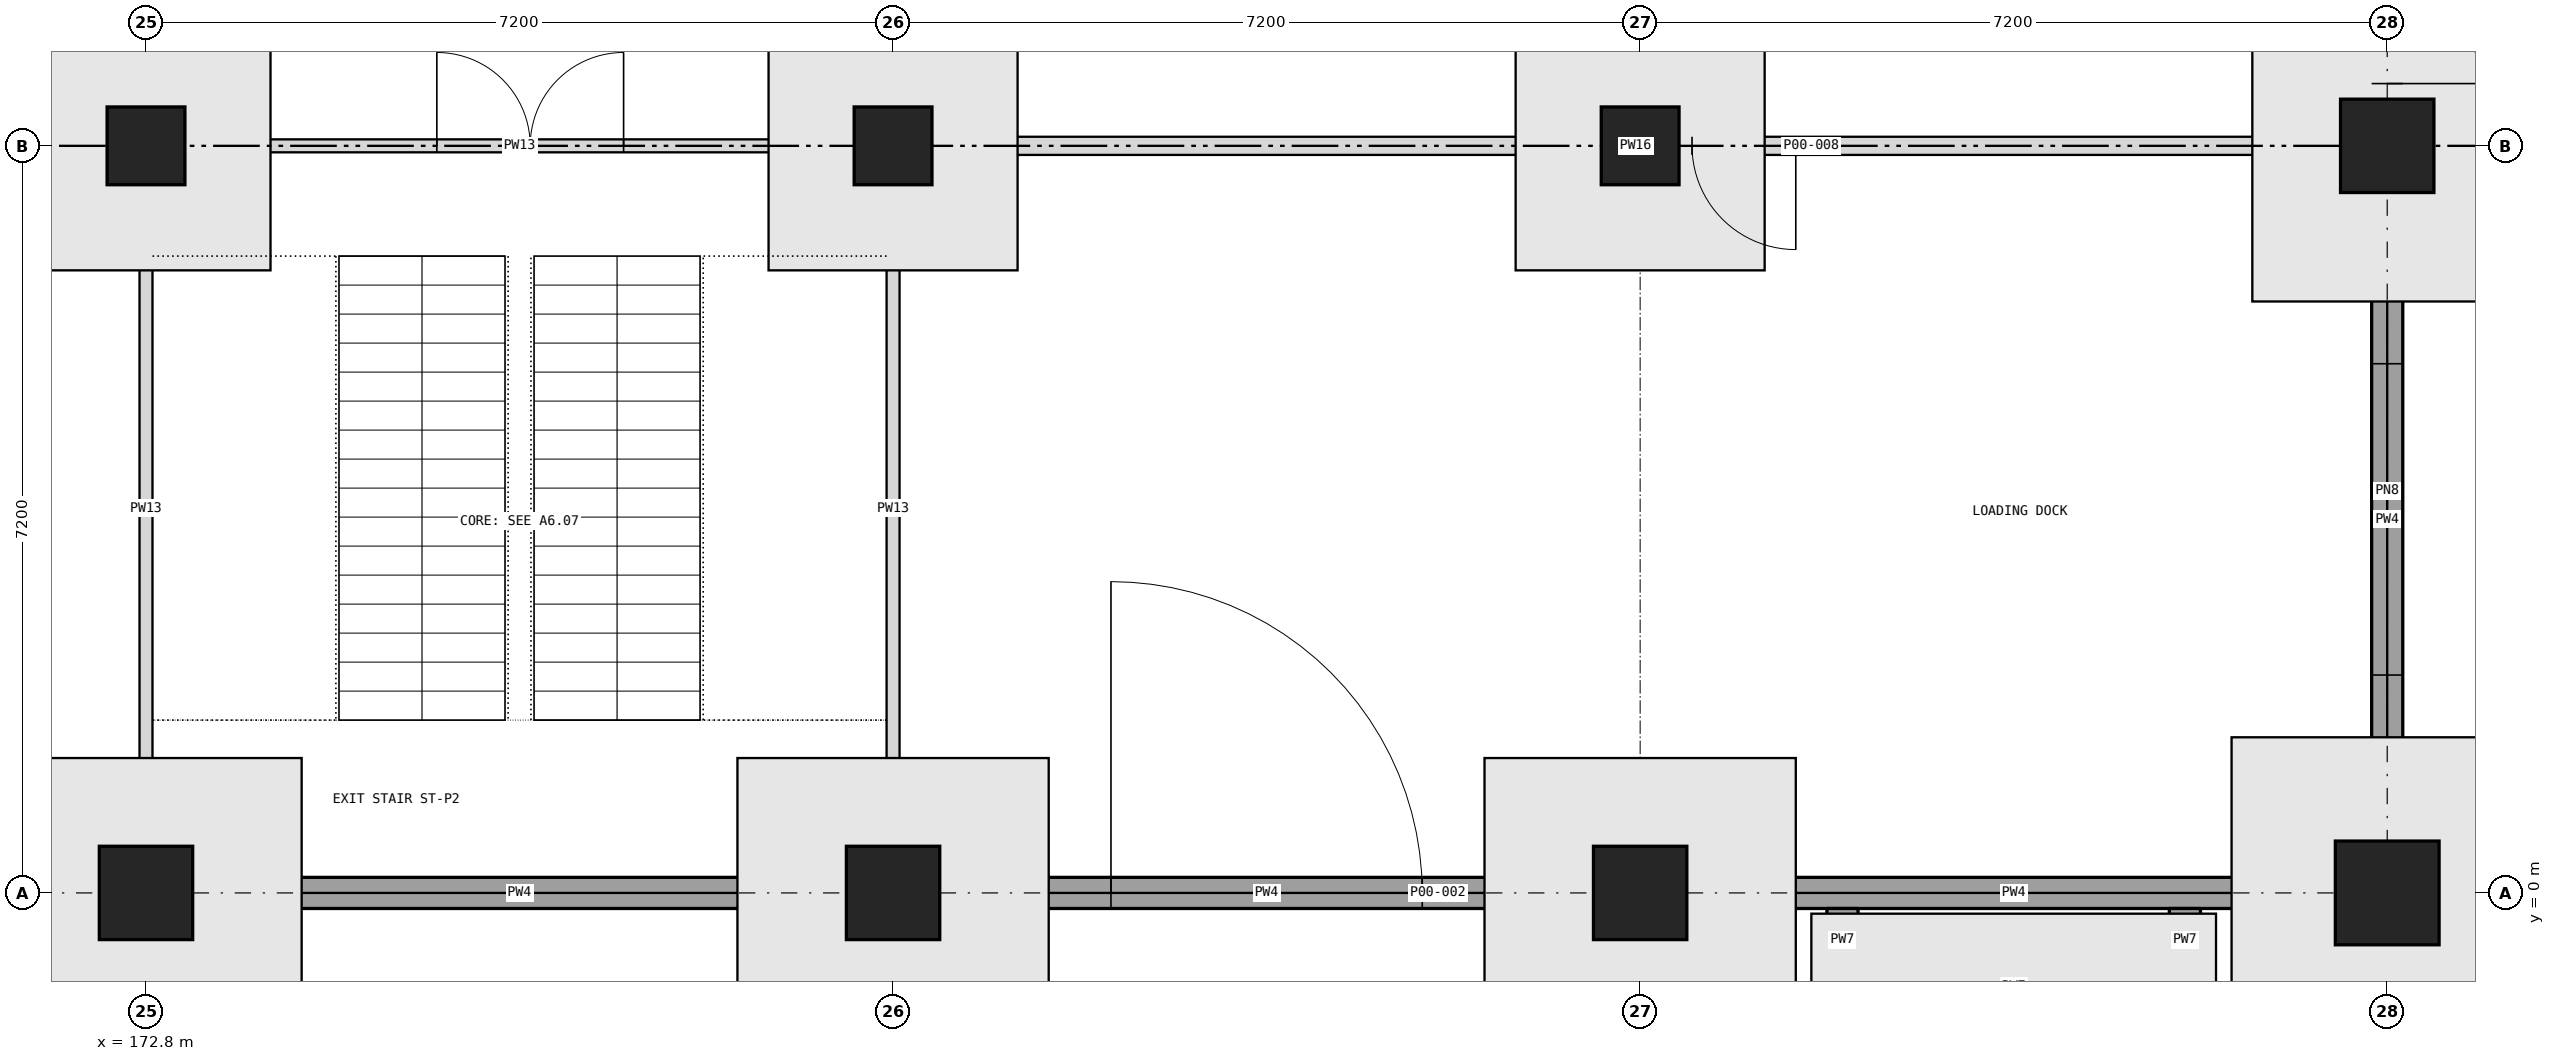
"""IFC4 building model, lengths in metres.
Left out: names, types, materials, properties, quantities, classifications, styles, units other than length and angle.
Written with IfcOpenShell. Run it as: python <this file> out.ifc"""

import sys

from ifc_helpers import new_model, si_unit, direction, frame, frame_2d, origin, origin_2d, place, context, subcontext, project, spatial, rectangle, extrude, element, fill, save


model = new_model("IFC4")
c1 = context("Model", 3, precision=1e-05, world=origin(), true_north=direction((0.0, 1.0)))
c2 = subcontext(c1, "Body", "Model", "MODEL_VIEW")
j1 = project(units=[si_unit("LENGTHUNIT", "METRE"), si_unit("PLANEANGLEUNIT", "RADIAN")], contexts=[c1])
p1 = place(None, origin())
s1 = spatial("IfcSite", under=j1, at=p1, CompositionType="ELEMENT")
p2 = place(p1, origin())
s2 = spatial("IfcBuilding", under=s1, at=p2, CompositionType="ELEMENT")
p3 = place(p2, origin())
s3 = spatial("IfcBuildingStorey", under=s2, at=p3, CompositionType="ELEMENT", Elevation=0.0)
p4 = place(p3, frame((172.8, 0.0, 0.0), z_axis=(0.0, 0.0, 1.0), x_axis=(1.0, 0.0, 0.0)))
e1 = element("IfcColumn", 1, at=p4, inside=s3, PredefinedType="COLUMN", context=c2, shape_type="SweptSolid", body=[
    extrude(rectangle(XDim=0.9, YDim=0.9, at=origin_2d()), origin(), (0.0, 0.0, 1.0), 6.0),
])
p5 = place(p3, frame((172.8, 7.2, 0.0), z_axis=(0.0, 0.0, 1.0), x_axis=(1.0, 0.0, 0.0)))
e2 = element("IfcColumn", 2, at=p5, inside=s3, PredefinedType="COLUMN", context=c2, shape_type="SweptSolid", body=[
    extrude(rectangle(XDim=0.75, YDim=0.75, at=origin_2d()), origin(), (0.0, 0.0, 1.0), 6.0),
])
p6 = place(p3, frame((180.0, 0.0, 0.0), z_axis=(0.0, 0.0, 1.0), x_axis=(1.0, 0.0, 0.0)))
e3 = element("IfcColumn", 3, at=p6, inside=s3, PredefinedType="COLUMN", context=c2, shape_type="SweptSolid", body=[
    extrude(rectangle(XDim=0.9, YDim=0.9, at=origin_2d()), origin(), (0.0, 0.0, 1.0), 6.0),
])
p7 = place(p3, frame((180.0, 7.2, 0.0), z_axis=(0.0, 0.0, 1.0), x_axis=(1.0, 0.0, 0.0)))
e4 = element("IfcColumn", 4, at=p7, inside=s3, PredefinedType="COLUMN", context=c2, shape_type="SweptSolid", body=[
    extrude(rectangle(XDim=0.75, YDim=0.75, at=origin_2d()), origin(), (0.0, 0.0, 1.0), 6.0),
])
p8 = place(p3, frame((187.2, 0.0, 0.0), z_axis=(0.0, 0.0, 1.0), x_axis=(1.0, 0.0, 0.0)))
e5 = element("IfcColumn", 5, at=p8, inside=s3, PredefinedType="COLUMN", context=c2, shape_type="SweptSolid", body=[
    extrude(rectangle(XDim=0.9, YDim=0.9, at=origin_2d()), origin(), (0.0, 0.0, 1.0), 6.0),
])
p9 = place(p3, frame((187.2, 7.2, 0.0), z_axis=(0.0, 0.0, 1.0), x_axis=(1.0, 0.0, 0.0)))
e6 = element("IfcColumn", 6, at=p9, inside=s3, PredefinedType="COLUMN", context=c2, shape_type="SweptSolid", body=[
    extrude(rectangle(XDim=0.75, YDim=0.75, at=origin_2d()), origin(), (0.0, 0.0, 1.0), 6.0),
])
p10 = place(p3, frame((194.4, 0.0, 0.0), z_axis=(0.0, 0.0, 1.0), x_axis=(1.0, 0.0, 0.0)))
e7 = element("IfcColumn", 7, at=p10, inside=s3, PredefinedType="COLUMN", context=c2, shape_type="SweptSolid", body=[
    extrude(rectangle(XDim=1.0, YDim=1.0, at=origin_2d()), origin(), (0.0, 0.0, 1.0), 6.0),
])
p11 = place(p3, frame((194.4, 7.2, 0.0), z_axis=(0.0, 0.0, 1.0), x_axis=(1.0, 0.0, 0.0)))
e8 = element("IfcColumn", 8, at=p11, inside=s3, PredefinedType="COLUMN", context=c2, shape_type="SweptSolid", body=[
    extrude(rectangle(XDim=0.9, YDim=0.9, at=origin_2d()), origin(), (0.0, 0.0, 1.0), 6.0),
])
for number, where, z_axis, x_axis in (
    (9, (166.05, 0.0, 0.0), (0.0, 0.0, 1.0), (1.0, 0.0, 0.0)),
    (10, (173.25, 0.0, 0.0), (0.0, 0.0, 1.0), (1.0, 0.0, 0.0)),
):
    element("IfcWall", number, at=place(p3, frame(where, z_axis=z_axis, x_axis=x_axis)), inside=s3, PredefinedType="SOLIDWALL", context=c2, shape_type="SweptSolid", body=[
        extrude(rectangle(XDim=6.3, YDim=0.3, at=frame_2d((3.15, 0.0))), origin(), (0.0, 0.0, 1.0), 5.1),
    ])
p12 = place(p3, frame((180.45, 0.0, 0.0), z_axis=(0.0, 0.0, 1.0), x_axis=(1.0, 0.0, 0.0)))
e11 = element("IfcWall", 11, at=p12, inside=s3, PredefinedType="SOLIDWALL", context=c2, shape_type="SweptSolid", body=[
    extrude(rectangle(XDim=6.3, YDim=0.3, at=frame_2d((3.15, 0.0))), origin(), (0.0, 0.0, 1.0), 5.1),
])
p13 = place(p12, frame((1.65, 0.0, 0.0)))
e12 = element("IfcOpeningElement", 12, at=p13, cuts=e11, PredefinedType="OPENING", context=c2, shape_type="SweptSolid", body=[
    extrude(rectangle(XDim=3.0, YDim=3.0, at=frame_2d((1.5, 1.5))), frame((0.0, 0.16, 0.0), z_axis=(0.0, -1.0, 0.0), x_axis=(1.0, 0.0, 0.0)), (0.0, 0.0, 1.0), 0.32),
])
p14 = place(p3, frame((187.65, 0.0, 0.0), z_axis=(0.0, 0.0, 1.0), x_axis=(1.0, 0.0, 0.0)))
e13 = element("IfcWall", 13, at=p14, inside=s3, PredefinedType="SOLIDWALL", context=c2, shape_type="SweptSolid", body=[
    extrude(rectangle(XDim=6.3, YDim=0.3, at=frame_2d((3.15, 0.0))), origin(), (0.0, 0.0, 1.0), 5.1),
])
p15 = place(p3, frame((194.4, 0.45, 0.0), z_axis=(0.0, 0.0, 1.0), x_axis=(0.0, 1.0, 0.0)))
e14 = element("IfcWall", 14, at=p15, inside=s3, PredefinedType="SOLIDWALL", context=c2, shape_type="SweptSolid", body=[
    extrude(rectangle(XDim=6.3, YDim=0.3, at=frame_2d((3.15, 0.0))), origin(), (0.0, 0.0, 1.0), 5.1),
])
p16 = place(p15, frame((1.65, 0.0, 2.4)))
e15 = element("IfcOpeningElement", 15, at=p16, cuts=e14, PredefinedType="OPENING", context=c2, shape_type="SweptSolid", body=[
    extrude(rectangle(XDim=3.0, YDim=1.2, at=frame_2d((1.5, 0.6))), frame((0.0, 0.16, 0.0), z_axis=(0.0, -1.0, 0.0), x_axis=(1.0, 0.0, 0.0)), (0.0, 0.0, 1.0), 0.32),
])
p17 = place(p3, frame((194.4, 7.65, 0.0), z_axis=(0.0, 0.0, 1.0), x_axis=(0.0, 1.0, 0.0)))
e16 = element("IfcWall", 16, at=p17, inside=s3, PredefinedType="SOLIDWALL", context=c2, shape_type="SweptSolid", body=[
    extrude(rectangle(XDim=6.3, YDim=0.3, at=frame_2d((3.15, 0.0))), origin(), (0.0, 0.0, 1.0), 5.1),
])
p18 = place(p17, frame((0.15, 0.0, 0.0)))
e17 = element("IfcOpeningElement", 17, at=p18, cuts=e16, PredefinedType="OPENING", context=c2, shape_type="SweptSolid", body=[
    extrude(rectangle(XDim=1.8, YDim=2.1, at=frame_2d((0.9, 1.05))), frame((0.0, 0.16, 0.0), z_axis=(0.0, -1.0, 0.0), x_axis=(1.0, 0.0, 0.0)), (0.0, 0.0, 1.0), 0.32),
])
p19 = place(p3, frame((189.0, -0.9, -0.5), z_axis=(0.0, 0.0, 1.0), x_axis=(1.0, 0.0, 0.0)))
e18 = element("IfcWall", 18, at=p19, inside=s3, PredefinedType="SOLIDWALL", context=c2, shape_type="SweptSolid", body=[
    extrude(rectangle(XDim=3.6, YDim=0.3, at=frame_2d((1.8, 0.0))), origin(), (0.0, 0.0, 1.0), 6.2),
])
for number, where, z_axis, x_axis in (
    (19, (189.15, -0.75, -0.5), (0.0, 0.0, 1.0), (0.0, 1.0, 0.0)),
    (20, (192.45, -0.75, -0.5), (0.0, 0.0, 1.0), (0.0, 1.0, 0.0)),
):
    element("IfcWall", number, at=place(p3, frame(where, z_axis=z_axis, x_axis=x_axis)), inside=s3, PredefinedType="SOLIDWALL", context=c2, shape_type="SweptSolid", body=[
        extrude(rectangle(XDim=0.6, YDim=0.3, at=frame_2d((0.3, 0.0))), origin(), (0.0, 0.0, 1.0), 6.2),
    ])
p20 = place(p3, frame((165.663, 7.2, 0.0), z_axis=(0.0, 0.0, 1.0), x_axis=(1.0, 0.0, 0.0)))
e21 = element("IfcWall", 21, at=p20, inside=s3, PredefinedType="PARTITIONING", context=c2, shape_type="SweptSolid", body=[
    extrude(rectangle(XDim=7.075, YDim=0.175, at=frame_2d((3.538, 0.0))), origin(), (0.0, 0.0, 1.0), 5.5),
])
p21 = place(p20, frame((3.038, 0.0, 0.0)))
e22 = element("IfcOpeningElement", 22, at=p21, cuts=e21, PredefinedType="OPENING", context=c2, shape_type="SweptSolid", body=[
    extrude(rectangle(XDim=1.0, YDim=2.2, at=frame_2d((0.5, 1.1))), frame((0.0, 0.097, 0.0), z_axis=(0.0, -1.0, 0.0), x_axis=(1.0, 0.0, 0.0)), (0.0, 0.0, 1.0), 0.195),
])
p22 = place(p3, frame((172.863, 7.2, 0.0), z_axis=(0.0, 0.0, 1.0), x_axis=(1.0, 0.0, 0.0)))
e23 = element("IfcWall", 23, at=p22, inside=s3, PredefinedType="SOLIDWALL", context=c2, shape_type="SweptSolid", body=[
    extrude(rectangle(XDim=7.075, YDim=0.125, at=frame_2d((3.538, 0.0))), origin(), (0.0, 0.0, 1.0), 5.5),
])
p23 = place(p22, frame((2.74, 0.0, 0.0)))
e24 = element("IfcOpeningElement", 24, at=p23, cuts=e23, PredefinedType="OPENING", context=c2, shape_type="SweptSolid", body=[
    extrude(rectangle(XDim=1.8, YDim=2.1, at=frame_2d((0.9, 1.05))), frame((0.0, 0.073, 0.0), z_axis=(0.0, -1.0, 0.0), x_axis=(1.0, 0.0, 0.0)), (0.0, 0.0, 1.0), 0.145),
])
p24 = place(p3, frame((180.062, 7.2, 0.0), z_axis=(0.0, 0.0, 1.0), x_axis=(1.0, 0.0, 0.0)))
e25 = element("IfcWall", 25, at=p24, inside=s3, PredefinedType="PARTITIONING", context=c2, shape_type="SweptSolid", body=[
    extrude(rectangle(XDim=14.188, YDim=0.175, at=frame_2d((7.094, 0.0))), origin(), (0.0, 0.0, 1.0), 5.5),
])
p25 = place(p24, frame((7.637, 0.0, 0.0)))
e26 = element("IfcOpeningElement", 26, at=p25, cuts=e25, PredefinedType="OPENING", context=c2, shape_type="SweptSolid", body=[
    extrude(rectangle(XDim=1.0, YDim=2.1, at=frame_2d((0.5, 1.05))), frame((0.0, 0.097, 0.0), z_axis=(0.0, -1.0, 0.0), x_axis=(1.0, 0.0, 0.0)), (0.0, 0.0, 1.0), 0.195),
])
for number, where, z_axis, x_axis in (
    (27, (172.8, 0.15, 0.0), (0.0, 0.0, 1.0), (0.0, 1.0, 0.0)),
    (28, (180.0, 0.15, 0.0), (0.0, 0.0, 1.0), (0.0, 1.0, 0.0)),
):
    element("IfcWall", number, at=place(p3, frame(where, z_axis=z_axis, x_axis=x_axis)), inside=s3, PredefinedType="SOLIDWALL", context=c2, shape_type="SweptSolid", body=[
        extrude(rectangle(XDim=7.113, YDim=0.125, at=frame_2d((3.556, 0.0))), origin(), (0.0, 0.0, 1.0), 5.5),
    ])
p26 = place(p13, frame((3.0, 0.0, 0.0), z_axis=(0.0, 0.0, 1.0), x_axis=(-1.0, 0.0, 0.0)))
e29 = element("IfcDoor", 29, at=p26, inside=s3, OperationType="ROLLINGUP", PredefinedType="DOOR", context=c2, shape_type="SweptSolid", body=[
    extrude(rectangle(XDim=3.0, YDim=3.0, at=frame_2d((1.5, 1.5))), frame((0.0, 0.025, 0.0), z_axis=(0.0, -1.0, 0.0), x_axis=(1.0, 0.0, 0.0)), (0.0, 0.0, 1.0), 0.05),
])
fill(e12, e29)
p27 = place(p16, origin())
e30 = element("IfcWindow", 30, at=p27, inside=s3, PartitioningType="DOUBLE_PANEL_VERTICAL", PredefinedType="WINDOW", context=c2, shape_type="SweptSolid", body=[
    extrude(rectangle(XDim=3.0, YDim=1.2, at=frame_2d((1.5, 0.6))), frame((0.0, 0.12, 0.0), z_axis=(0.0, -1.0, 0.0), x_axis=(1.0, 0.0, 0.0)), (0.0, 0.0, 1.0), 0.06),
])
fill(e15, e30)
p28 = place(p18, frame((1.8, 0.0, 0.0), z_axis=(0.0, 0.0, 1.0), x_axis=(-1.0, 0.0, 0.0)))
e31 = element("IfcDoor", 31, at=p28, inside=s3, OperationType="DOUBLE_DOOR_SINGLE_SWING", PredefinedType="DOOR", context=c2, shape_type="SweptSolid", body=[
    extrude(rectangle(XDim=1.8, YDim=2.1, at=frame_2d((0.9, 1.05))), frame((0.0, 0.025, 0.0), z_axis=(0.0, -1.0, 0.0), x_axis=(1.0, 0.0, 0.0)), (0.0, 0.0, 1.0), 0.05),
])
fill(e17, e31)
p29 = place(p23, origin())
e32 = element("IfcDoor", 32, at=p29, inside=s3, OperationType="DOUBLE_DOOR_SINGLE_SWING", PredefinedType="DOOR", context=c2, shape_type="SweptSolid", body=[
    extrude(rectangle(XDim=1.8, YDim=2.1, at=frame_2d((0.9, 1.05))), frame((0.0, 0.025, 0.0), z_axis=(0.0, -1.0, 0.0), x_axis=(1.0, 0.0, 0.0)), (0.0, 0.0, 1.0), 0.05),
])
fill(e24, e32)
p30 = place(p25, frame((1.0, 0.0, 0.0), z_axis=(0.0, 0.0, 1.0), x_axis=(-1.0, 0.0, 0.0)))
e33 = element("IfcDoor", 33, at=p30, inside=s3, OperationType="SINGLE_SWING_LEFT", PredefinedType="DOOR", context=c2, shape_type="SweptSolid", body=[
    extrude(rectangle(XDim=1.0, YDim=2.1, at=frame_2d((0.5, 1.05))), frame((0.0, 0.025, 0.0), z_axis=(0.0, -1.0, 0.0), x_axis=(1.0, 0.0, 0.0)), (0.0, 0.0, 1.0), 0.05),
])
fill(e26, e33)
save(model, sys.argv[1])
